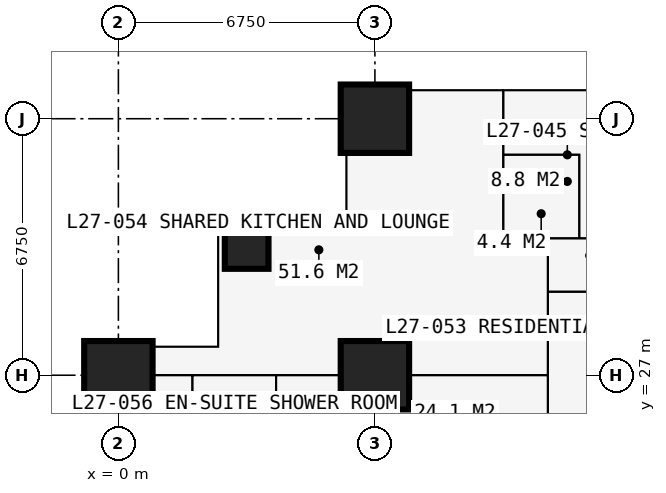
"""IFC4 building model, lengths in metres.
Left out: names, types, materials, properties, quantities, classifications, styles, units other than length and angle.
Written with IfcOpenShell. Run it as: python <this file> out.ifc"""

import sys

from ifc_helpers import new_model, si_unit, direction, frame, frame_2d, origin, origin_2d, place, context, subcontext, project, spatial, rectangle, extrude, element, fill, save


model = new_model("IFC4")
c1 = context("Model", 3, precision=1e-05, world=origin(), true_north=direction((0.0, 1.0)))
c2 = subcontext(c1, "Body", "Model", "MODEL_VIEW")
j1 = project(units=[si_unit("LENGTHUNIT", "METRE"), si_unit("PLANEANGLEUNIT", "RADIAN")], contexts=[c1])
p1 = place(None, origin())
s1 = spatial("IfcSite", under=j1, at=p1, CompositionType="ELEMENT")
p2 = place(p1, origin())
s2 = spatial("IfcBuilding", under=s1, at=p2, CompositionType="ELEMENT")
p3 = place(p2, frame((0.0, 0.0, 101.7)))
s3 = spatial("IfcBuildingStorey", under=s2, at=p3, CompositionType="ELEMENT", Elevation=101.7)
p4 = place(p3, frame((0.0, 27.0, 0.0), z_axis=(0.0, 0.0, 1.0), x_axis=(1.0, 0.0, 0.0)))
e1 = element("IfcColumn", 1, at=p4, inside=s3, PredefinedType="COLUMN", context=c2, shape_type="SweptSolid", body=[
    extrude(rectangle(XDim=1.8, YDim=1.8, at=origin_2d()), origin(), (0.0, 0.0, 1.0), 3.6),
])
p5 = place(p3, frame((3.375, 30.375, 0.0), z_axis=(0.0, 0.0, 1.0), x_axis=(1.0, 0.0, 0.0)))
e2 = element("IfcColumn", 2, at=p5, inside=s3, PredefinedType="COLUMN", context=c2, shape_type="SweptSolid", body=[
    extrude(rectangle(XDim=1.15, YDim=1.15, at=origin_2d()), origin(), (0.0, 0.0, 1.0), 3.6),
])
for number, where, z_axis, x_axis in (
    (3, (6.75, 27.0, 0.0), (0.0, 0.0, 1.0), (1.0, 0.0, 0.0)),
    (4, (6.75, 33.75, 0.0), (0.0, 0.0, 1.0), (1.0, 0.0, 0.0)),
):
    element("IfcColumn", number, at=place(p3, frame(where, z_axis=z_axis, x_axis=x_axis)), inside=s3, PredefinedType="COLUMN", context=c2, shape_type="SweptSolid", body=[
        extrude(rectangle(XDim=1.8, YDim=1.8, at=origin_2d()), origin(), (0.0, 0.0, 1.0), 3.6),
    ])
p6 = place(p3, frame((6.0, 34.5, 0.0), z_axis=(0.0, 0.0, 1.0), x_axis=(0.0, -1.0, 0.0)))
e5 = element("IfcWall", 5, at=p6, inside=s3, PredefinedType="SOLIDWALL", context=c2, shape_type="SweptSolid", body=[
    extrude(rectangle(XDim=3.375, YDim=0.3, at=frame_2d((1.688, 0.0))), origin(), (0.0, 0.0, 1.0), 3.375),
])
p7 = place(p6, frame((1.833, 0.0, 0.9)))
e6 = element("IfcOpeningElement", 6, at=p7, cuts=e5, PredefinedType="OPENING", context=c2, shape_type="SweptSolid", body=[
    extrude(rectangle(XDim=1.2, YDim=1.8, at=frame_2d((0.6, 0.9))), frame((0.0, 0.16, 0.0), z_axis=(0.0, -1.0, 0.0), x_axis=(1.0, 0.0, 0.0)), (0.0, 0.0, 1.0), 0.32),
])
p8 = place(p3, frame((6.0, 31.125, 0.0), z_axis=(0.0, 0.0, 1.0), x_axis=(-1.0, 0.0, 0.0)))
e7 = element("IfcWall", 7, at=p8, inside=s3, PredefinedType="SOLIDWALL", context=c2, shape_type="SweptSolid", body=[
    extrude(rectangle(XDim=3.375, YDim=0.3, at=frame_2d((1.688, 0.0))), origin(), (0.0, 0.0, 1.0), 3.375),
])
p9 = place(p8, frame((0.788, 0.0, 0.6)))
e8 = element("IfcOpeningElement", 8, at=p9, cuts=e7, PredefinedType="OPENING", context=c2, shape_type="SweptSolid", body=[
    extrude(rectangle(XDim=1.8, YDim=2.1, at=frame_2d((0.9, 1.05))), frame((0.0, 0.16, 0.0), z_axis=(0.0, -1.0, 0.0), x_axis=(1.0, 0.0, 0.0)), (0.0, 0.0, 1.0), 0.32),
])
p10 = place(p3, frame((2.625, 31.125, 0.0), z_axis=(0.0, 0.0, 1.0), x_axis=(0.0, -1.0, 0.0)))
e9 = element("IfcWall", 9, at=p10, inside=s3, PredefinedType="SOLIDWALL", context=c2, shape_type="SweptSolid", body=[
    extrude(rectangle(XDim=3.375, YDim=0.3, at=frame_2d((1.688, 0.0))), origin(), (0.0, 0.0, 1.0), 3.375),
])
p11 = place(p10, frame((0.788, 0.0, 0.6)))
e10 = element("IfcOpeningElement", 10, at=p11, cuts=e9, PredefinedType="OPENING", context=c2, shape_type="SweptSolid", body=[
    extrude(rectangle(XDim=1.8, YDim=2.1, at=frame_2d((0.9, 1.05))), frame((0.0, 0.16, 0.0), z_axis=(0.0, -1.0, 0.0), x_axis=(1.0, 0.0, 0.0)), (0.0, 0.0, 1.0), 0.32),
])
p12 = place(p3, frame((2.625, 27.75, 0.0), z_axis=(0.0, 0.0, 1.0), x_axis=(-1.0, 0.0, 0.0)))
e11 = element("IfcWall", 11, at=p12, inside=s3, PredefinedType="SOLIDWALL", context=c2, shape_type="SweptSolid", body=[
    extrude(rectangle(XDim=3.375, YDim=0.3, at=frame_2d((1.688, 0.0))), origin(), (0.0, 0.0, 1.0), 3.375),
])
p13 = place(p12, frame((0.343, 0.0, 0.9)))
e12 = element("IfcOpeningElement", 12, at=p13, cuts=e11, PredefinedType="OPENING", context=c2, shape_type="SweptSolid", body=[
    extrude(rectangle(XDim=1.2, YDim=1.8, at=frame_2d((0.6, 0.9))), frame((0.0, 0.16, 0.0), z_axis=(0.0, -1.0, 0.0), x_axis=(1.0, 0.0, 0.0)), (0.0, 0.0, 1.0), 0.32),
])
p14 = place(p3, frame((-0.734, 27.0, 0.0), z_axis=(0.0, 0.0, 1.0), x_axis=(1.0, 0.0, 0.0)))
e13 = element("IfcWall", 13, at=p14, inside=s3, PredefinedType="PARTITIONING", context=c2, shape_type="SweptSolid", body=[
    extrude(rectangle(XDim=12.034, YDim=0.15, at=frame_2d((6.017, 0.0))), origin(), (0.0, 0.0, 1.0), 2.806),
])
p15 = place(p14, frame((8.434, 0.0, 0.0)))
e14 = element("IfcOpeningElement", 14, at=p15, cuts=e13, PredefinedType="OPENING", context=c2, shape_type="SweptSolid", body=[
    extrude(rectangle(XDim=1.0, YDim=2.2, at=frame_2d((0.5, 1.1))), frame((0.0, 0.085, 0.0), z_axis=(0.0, -1.0, 0.0), x_axis=(1.0, 0.0, 0.0)), (0.0, 0.0, 1.0), 0.17),
])
p16 = place(p3, frame((1.95, 25.0, 0.0), z_axis=(0.0, 0.0, 1.0), x_axis=(0.0, 1.0, 0.0)))
e15 = element("IfcWall", 15, at=p16, inside=s3, PredefinedType="PARTITIONING", context=c2, shape_type="SweptSolid", body=[
    extrude(rectangle(XDim=2.0, YDim=0.1, at=frame_2d((1.0, 0.0))), origin(), (0.0, 0.0, 1.0), 3.375),
])
p17 = place(p3, frame((4.15, 10.125, 0.0), z_axis=(0.0, 0.0, 1.0), x_axis=(0.0, 1.0, 0.0)))
e16 = element("IfcWall", 16, at=p17, inside=s3, PredefinedType="PARTITIONING", context=c2, shape_type="SweptSolid", body=[
    extrude(rectangle(XDim=16.875, YDim=0.1, at=frame_2d((8.438, 0.0))), origin(), (0.0, 0.0, 1.0), 3.375),
])
p18 = place(p17, frame((13.7, 0.0, 0.0)))
e17 = element("IfcOpeningElement", 17, at=p18, cuts=e16, PredefinedType="OPENING", context=c2, shape_type="SweptSolid", body=[
    extrude(rectangle(XDim=0.95, YDim=2.2, at=frame_2d((0.475, 1.1))), frame((0.0, 0.06, 0.0), z_axis=(0.0, -1.0, 0.0), x_axis=(1.0, 0.0, 0.0)), (0.0, 0.0, 1.0), 0.12),
])
p19 = place(p17, frame((4.2, 0.0, 0.0)))
e18 = element("IfcOpeningElement", 18, at=p19, cuts=e16, PredefinedType="OPENING", context=c2, shape_type="SweptSolid", body=[
    extrude(rectangle(XDim=0.95, YDim=2.2, at=frame_2d((0.475, 1.1))), frame((0.0, 0.06, 0.0), z_axis=(0.0, -1.0, 0.0), x_axis=(1.0, 0.0, 0.0)), (0.0, 0.0, 1.0), 0.12),
])
p20 = place(p17, frame((10.95, 0.0, 0.0)))
e19 = element("IfcOpeningElement", 19, at=p20, cuts=e16, PredefinedType="OPENING", context=c2, shape_type="SweptSolid", body=[
    extrude(rectangle(XDim=0.95, YDim=2.2, at=frame_2d((0.475, 1.1))), frame((0.0, 0.06, 0.0), z_axis=(0.0, -1.0, 0.0), x_axis=(1.0, 0.0, 0.0)), (0.0, 0.0, 1.0), 0.12),
])
p21 = place(p3, frame((10.125, 30.6, 0.0), z_axis=(0.0, 0.0, 1.0), x_axis=(0.0, 1.0, 0.0)))
e20 = element("IfcWall", 20, at=p21, inside=s3, PredefinedType="PARTITIONING", context=c2, shape_type="SweptSolid", body=[
    extrude(rectangle(XDim=3.884, YDim=0.1, at=frame_2d((1.942, 0.0))), origin(), (0.0, 0.0, 1.0), 3.375),
])
p22 = place(p3, frame((10.125, 30.6, 0.0), z_axis=(0.0, 0.0, 1.0), x_axis=(1.0, 0.0, 0.0)))
e21 = element("IfcWall", 21, at=p22, inside=s3, PredefinedType="PARTITIONING", context=c2, shape_type="SweptSolid", body=[
    extrude(rectangle(XDim=3.375, YDim=0.1, at=frame_2d((1.688, 0.0))), origin(), (0.0, 0.0, 1.0), 3.375),
])
p23 = place(p22, frame((2.2, 0.0, 0.0)))
e22 = element("IfcOpeningElement", 22, at=p23, cuts=e21, PredefinedType="OPENING", context=c2, shape_type="SweptSolid", body=[
    extrude(rectangle(XDim=0.95, YDim=2.2, at=frame_2d((0.475, 1.1))), frame((0.0, 0.06, 0.0), z_axis=(0.0, -1.0, 0.0), x_axis=(1.0, 0.0, 0.0)), (0.0, 0.0, 1.0), 0.12),
])
p24 = place(p3, frame((10.125, 32.8, 0.0), z_axis=(0.0, 0.0, 1.0), x_axis=(1.0, 0.0, 0.0)))
e23 = element("IfcWall", 23, at=p24, inside=s3, PredefinedType="PARTITIONING", context=c2, shape_type="SweptSolid", body=[
    extrude(rectangle(XDim=2.0, YDim=0.1, at=frame_2d((1.0, 0.0))), origin(), (0.0, 0.0, 1.0), 3.375),
])
p25 = place(p3, frame((11.3, 11.3, 0.0), z_axis=(0.0, 0.0, 1.0), x_axis=(0.0, 1.0, 0.0)))
e24 = element("IfcWall", 24, at=p25, inside=s3, PredefinedType="PARTITIONING", context=c2, shape_type="SweptSolid", body=[
    extrude(rectangle(XDim=19.3, YDim=0.15, at=frame_2d((9.65, 0.0))), origin(), (0.0, 0.0, 1.0), 3.375),
])
p26 = place(p25, frame((13.525, 0.0, 0.0)))
e25 = element("IfcOpeningElement", 25, at=p26, cuts=e24, PredefinedType="OPENING", context=c2, shape_type="SweptSolid", body=[
    extrude(rectangle(XDim=1.0, YDim=2.2, at=frame_2d((0.5, 1.1))), frame((0.0, 0.085, 0.0), z_axis=(0.0, -1.0, 0.0), x_axis=(1.0, 0.0, 0.0)), (0.0, 0.0, 1.0), 0.17),
])
p27 = place(p25, frame((10.438, 0.0, 0.0)))
e26 = element("IfcOpeningElement", 26, at=p27, cuts=e24, PredefinedType="OPENING", context=c2, shape_type="SweptSolid", body=[
    extrude(rectangle(XDim=1.0, YDim=2.2, at=frame_2d((0.5, 1.1))), frame((0.0, 0.085, 0.0), z_axis=(0.0, -1.0, 0.0), x_axis=(1.0, 0.0, 0.0)), (0.0, 0.0, 1.0), 0.17),
])
p28 = place(p3, frame((11.3, 29.2, 0.0), z_axis=(0.0, 0.0, 1.0), x_axis=(1.0, 0.0, 0.0)))
e27 = element("IfcWall", 27, at=p28, inside=s3, PredefinedType="PARTITIONING", context=c2, shape_type="SweptSolid", body=[
    extrude(rectangle(XDim=19.075, YDim=0.15, at=frame_2d((9.538, 0.0))), origin(), (0.0, 0.0, 1.0), 3.375),
])
p29 = place(p28, frame((5.825, 0.0, 0.0)))
e28 = element("IfcOpeningElement", 28, at=p29, cuts=e27, PredefinedType="OPENING", context=c2, shape_type="SweptSolid", body=[
    extrude(rectangle(XDim=0.95, YDim=2.2, at=frame_2d((0.475, 1.1))), frame((0.0, 0.085, 0.0), z_axis=(0.0, -1.0, 0.0), x_axis=(1.0, 0.0, 0.0)), (0.0, 0.0, 1.0), 0.17),
])
p30 = place(p28, frame((9.2, 0.0, 0.0)))
e29 = element("IfcOpeningElement", 29, at=p30, cuts=e27, PredefinedType="OPENING", context=c2, shape_type="SweptSolid", body=[
    extrude(rectangle(XDim=0.95, YDim=2.2, at=frame_2d((0.475, 1.1))), frame((0.0, 0.085, 0.0), z_axis=(0.0, -1.0, 0.0), x_axis=(1.0, 0.0, 0.0)), (0.0, 0.0, 1.0), 0.17),
])
p31 = place(p28, frame((0.6, 0.0, 0.0)))
e30 = element("IfcOpeningElement", 30, at=p31, cuts=e27, PredefinedType="OPENING", context=c2, shape_type="SweptSolid", body=[
    extrude(rectangle(XDim=1.0, YDim=2.2, at=frame_2d((0.5, 1.1))), frame((0.0, 0.085, 0.0), z_axis=(0.0, -1.0, 0.0), x_axis=(1.0, 0.0, 0.0)), (0.0, 0.0, 1.0), 0.17),
])
p32 = place(p3, frame((12.125, 30.6, 0.0), z_axis=(0.0, 0.0, 1.0), x_axis=(0.0, 1.0, 0.0)))
e31 = element("IfcWall", 31, at=p32, inside=s3, PredefinedType="PARTITIONING", context=c2, shape_type="SweptSolid", body=[
    extrude(rectangle(XDim=2.2, YDim=0.1, at=frame_2d((1.1, 0.0))), origin(), (0.0, 0.0, 1.0), 3.375),
])
p33 = place(p32, frame((0.65, 0.0, 0.0)))
e32 = element("IfcOpeningElement", 32, at=p33, cuts=e31, PredefinedType="OPENING", context=c2, shape_type="SweptSolid", body=[
    extrude(rectangle(XDim=0.9, YDim=2.2, at=frame_2d((0.45, 1.1))), frame((0.0, 0.06, 0.0), z_axis=(0.0, -1.0, 0.0), x_axis=(1.0, 0.0, 0.0)), (0.0, 0.0, 1.0), 0.12),
])
p34 = place(p7, origin())
e33 = element("IfcWindow", 33, at=p34, inside=s3, PartitioningType="SINGLE_PANEL", PredefinedType="WINDOW", context=c2, shape_type="SweptSolid", body=[
    extrude(rectangle(XDim=1.2, YDim=1.8, at=frame_2d((0.6, 0.9))), frame((0.0, 0.03, 0.0), z_axis=(0.0, -1.0, 0.0), x_axis=(1.0, 0.0, 0.0)), (0.0, 0.0, 1.0), 0.06),
])
fill(e6, e33)
p35 = place(p9, origin())
e34 = element("IfcWindow", 34, at=p35, inside=s3, PartitioningType="SINGLE_PANEL", PredefinedType="WINDOW", context=c2, shape_type="SweptSolid", body=[
    extrude(rectangle(XDim=1.8, YDim=2.1, at=frame_2d((0.9, 1.05))), frame((0.0, 0.03, 0.0), z_axis=(0.0, -1.0, 0.0), x_axis=(1.0, 0.0, 0.0)), (0.0, 0.0, 1.0), 0.06),
])
fill(e8, e34)
p36 = place(p11, origin())
e35 = element("IfcWindow", 35, at=p36, inside=s3, PartitioningType="SINGLE_PANEL", PredefinedType="WINDOW", context=c2, shape_type="SweptSolid", body=[
    extrude(rectangle(XDim=1.8, YDim=2.1, at=frame_2d((0.9, 1.05))), frame((0.0, 0.03, 0.0), z_axis=(0.0, -1.0, 0.0), x_axis=(1.0, 0.0, 0.0)), (0.0, 0.0, 1.0), 0.06),
])
fill(e10, e35)
p37 = place(p13, origin())
e36 = element("IfcWindow", 36, at=p37, inside=s3, PartitioningType="SINGLE_PANEL", PredefinedType="WINDOW", context=c2, shape_type="SweptSolid", body=[
    extrude(rectangle(XDim=1.2, YDim=1.8, at=frame_2d((0.6, 0.9))), frame((0.0, 0.03, 0.0), z_axis=(0.0, -1.0, 0.0), x_axis=(1.0, 0.0, 0.0)), (0.0, 0.0, 1.0), 0.06),
])
fill(e12, e36)
p38 = place(p33, origin())
e37 = element("IfcDoor", 37, at=p38, inside=s3, OperationType="SINGLE_SWING_RIGHT", PredefinedType="DOOR", context=c2, shape_type="SweptSolid", body=[
    extrude(rectangle(XDim=0.9, YDim=2.2, at=frame_2d((0.45, 1.1))), frame((0.0, 0.025, 0.0), z_axis=(0.0, -1.0, 0.0), x_axis=(1.0, 0.0, 0.0)), (0.0, 0.0, 1.0), 0.05),
])
fill(e32, e37)
p39 = place(p31, origin())
e38 = element("IfcDoor", 38, at=p39, inside=s3, OperationType="SINGLE_SWING_LEFT", PredefinedType="DOOR", context=c2, shape_type="SweptSolid", body=[
    extrude(rectangle(XDim=1.0, YDim=2.2, at=frame_2d((0.5, 1.1))), frame((0.0, 0.025, 0.0), z_axis=(0.0, -1.0, 0.0), x_axis=(1.0, 0.0, 0.0)), (0.0, 0.0, 1.0), 0.05),
])
fill(e30, e38)
p40 = place(p15, origin())
e39 = element("IfcDoor", 39, at=p40, inside=s3, OperationType="SINGLE_SWING_LEFT", PredefinedType="DOOR", context=c2, shape_type="SweptSolid", body=[
    extrude(rectangle(XDim=1.0, YDim=2.2, at=frame_2d((0.5, 1.1))), frame((0.0, 0.025, 0.0), z_axis=(0.0, -1.0, 0.0), x_axis=(1.0, 0.0, 0.0)), (0.0, 0.0, 1.0), 0.05),
])
fill(e14, e39)
save(model, sys.argv[1])
